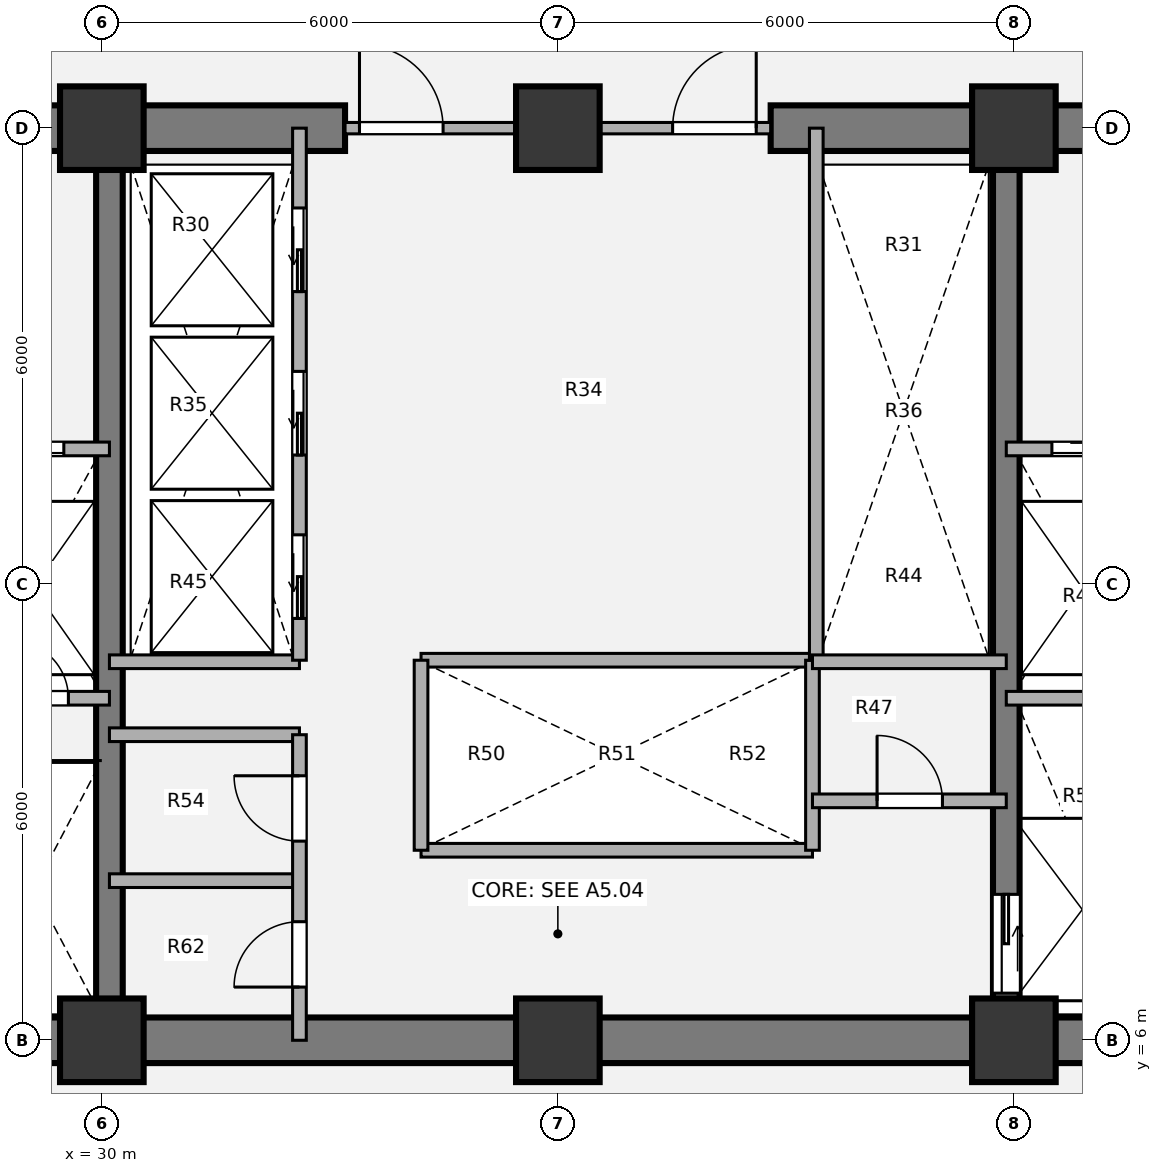
"""IFC4 building model, lengths in metres.
Left out: names, types, materials, properties, quantities, classifications, styles, units other than length and angle.
Written with IfcOpenShell. Run it as: python <this file> out.ifc"""

import sys

from ifc_helpers import new_model, si_unit, direction, frame, frame_2d, origin, origin_2d, place, context, subcontext, project, spatial, rectangle, extrude, source, transform, mapped, element, fill, save


model = new_model("IFC4")
c1 = context("Model", 3, precision=1e-05, world=origin(), true_north=direction((0.0, 1.0)))
c2 = subcontext(c1, "Body", "Model", "MODEL_VIEW")
j1 = project(units=[si_unit("LENGTHUNIT", "METRE"), si_unit("PLANEANGLEUNIT", "RADIAN")], contexts=[c1])
p1 = place(None, origin())
s1 = spatial("IfcSite", under=j1, at=p1, CompositionType="ELEMENT")
p2 = place(p1, origin())
s2 = spatial("IfcBuilding", under=s1, at=p2, CompositionType="ELEMENT")
p3 = place(p2, frame((0.0, 0.0, 64.8)))
s3 = spatial("IfcBuildingStorey", under=s2, at=p3, CompositionType="ELEMENT", Elevation=64.8)
m1 = source(origin(), c2, "Body", "SweptSolid", [
    extrude(rectangle(XDim=1.1, YDim=1.1, at=origin_2d()), origin(), (0.0, 0.0, 1.0), 3.78),
])
for number, where, z_axis, x_axis in (
    (1, (30.0, 6.0, 0.0), (0.0, 0.0, 1.0), (1.0, 0.0, 0.0)),
    (2, (36.0, 6.0, 0.0), (0.0, 0.0, 1.0), (1.0, 0.0, 0.0)),
    (3, (42.0, 6.0, 0.0), (0.0, 0.0, 1.0), (1.0, 0.0, 0.0)),
    (4, (30.0, 18.0, 0.0), (0.0, 0.0, 1.0), (1.0, 0.0, 0.0)),
    (5, (36.0, 18.0, 0.0), (0.0, 0.0, 1.0), (1.0, 0.0, 0.0)),
    (6, (42.0, 18.0, 0.0), (0.0, 0.0, 1.0), (1.0, 0.0, 0.0)),
):
    element("IfcColumn", number, at=place(p3, frame(where, z_axis=z_axis, x_axis=x_axis)), inside=s3, PredefinedType="COLUMN", context=c2, shape_type="MappedRepresentation", body=[
        mapped(m1, transform((0.0, 0.0, 0.0), x_axis=(1.0, 0.0, 0.0), y_axis=(0.0, 1.0, 0.0), z_axis=(0.0, 0.0, 1.0), scale=1.0)),
    ])
p4 = place(p3, frame((48.3, 6.0, 0.0), z_axis=(0.0, 0.0, 1.0), x_axis=(-1.0, 0.0, 0.0)))
e7 = element("IfcWall", 7, at=p4, inside=s3, PredefinedType="SHEAR", context=c2, shape_type="SweptSolid", body=[
    extrude(rectangle(XDim=24.6, YDim=0.6, at=frame_2d((12.3, 0.0))), origin(), (0.0, 0.0, 1.0), 3.78),
])
p5 = place(p3, frame((23.7, 18.0, 0.0), z_axis=(0.0, 0.0, 1.0), x_axis=(1.0, 0.0, 0.0)))
e8 = element("IfcWall", 8, at=p5, inside=s3, PredefinedType="SHEAR", context=c2, shape_type="SweptSolid", body=[
    extrude(rectangle(XDim=9.5, YDim=0.6, at=frame_2d((4.75, 0.0))), origin(), (0.0, 0.0, 1.0), 3.78),
])
p6 = place(p5, frame((2.95, 0.0, 0.0)))
e9 = element("IfcOpeningElement", 9, at=p6, cuts=e8, PredefinedType="OPENING", context=c2, shape_type="SweptSolid", body=[
    extrude(rectangle(XDim=1.1, YDim=2.1, at=origin_2d()), frame((0.55, 0.31, 1.05), z_axis=(0.0, -1.0, 0.0), x_axis=(1.0, 0.0, 0.0)), (0.0, 0.0, 1.0), 0.62),
])
p7 = place(p3, frame((38.8, 18.0, 0.0), z_axis=(0.0, 0.0, 1.0), x_axis=(1.0, 0.0, 0.0)))
e10 = element("IfcWall", 10, at=p7, inside=s3, PredefinedType="SHEAR", context=c2, shape_type="SweptSolid", body=[
    extrude(rectangle(XDim=9.5, YDim=0.6, at=frame_2d((4.75, 0.0))), origin(), (0.0, 0.0, 1.0), 3.78),
])
p8 = place(p7, frame((5.45, 0.0, 0.0)))
e11 = element("IfcOpeningElement", 11, at=p8, cuts=e10, PredefinedType="OPENING", context=c2, shape_type="SweptSolid", body=[
    extrude(rectangle(XDim=1.1, YDim=2.1, at=origin_2d()), frame((0.55, 0.31, 1.05), z_axis=(0.0, -1.0, 0.0), x_axis=(1.0, 0.0, 0.0)), (0.0, 0.0, 1.0), 0.62),
])
p9 = place(p3, frame((30.1, 6.0, 0.0), z_axis=(0.0, 0.0, 1.0), x_axis=(0.0, 1.0, 0.0)))
e12 = element("IfcWall", 12, at=p9, inside=s3, PredefinedType="SHEAR", context=c2, shape_type="SweptSolid", body=[
    extrude(rectangle(XDim=12.0, YDim=0.35, at=frame_2d((6.0, 0.0))), origin(), (0.0, 0.0, 1.0), 3.78),
])
p10 = place(p3, frame((41.9, 18.0, 0.0), z_axis=(0.0, 0.0, 1.0), x_axis=(0.0, -1.0, 0.0)))
e13 = element("IfcWall", 13, at=p10, inside=s3, PredefinedType="SHEAR", context=c2, shape_type="SweptSolid", body=[
    extrude(rectangle(XDim=12.0, YDim=0.35, at=frame_2d((6.0, 0.0))), origin(), (0.0, 0.0, 1.0), 3.78),
])
p11 = place(p10, frame((10.08, 0.0, 0.0)))
e14 = element("IfcOpeningElement", 14, at=p11, cuts=e13, PredefinedType="OPENING", context=c2, shape_type="SweptSolid", body=[
    extrude(rectangle(XDim=1.3, YDim=2.1, at=origin_2d()), frame((0.65, 0.185, 1.05), z_axis=(0.0, -1.0, 0.0), x_axis=(1.0, 0.0, 0.0)), (0.0, 0.0, 1.0), 0.37),
])
for number, where, z_axis, x_axis in (
    (15, (34.2, 11.0, 0.0), (0.0, 0.0, 1.0), (1.0, 0.0, 0.0)),
    (16, (34.2, 8.5, 0.0), (0.0, 0.0, 1.0), (1.0, 0.0, 0.0)),
):
    element("IfcWall", number, at=place(p3, frame(where, z_axis=z_axis, x_axis=x_axis)), inside=s3, PredefinedType="PARTITIONING", context=c2, shape_type="SweptSolid", body=[
        extrude(rectangle(XDim=5.15, YDim=0.18, at=frame_2d((2.575, 0.0))), origin(), (0.0, 0.0, 1.0), 3.5),
    ])
for number, where, z_axis, x_axis in (
    (17, (34.2, 8.5, 0.0), (0.0, 0.0, 1.0), (0.0, 1.0, 0.0)),
    (18, (39.35, 8.5, 0.0), (0.0, 0.0, 1.0), (0.0, 1.0, 0.0)),
):
    element("IfcWall", number, at=place(p3, frame(where, z_axis=z_axis, x_axis=x_axis)), inside=s3, PredefinedType="PARTITIONING", context=c2, shape_type="SweptSolid", body=[
        extrude(rectangle(XDim=2.5, YDim=0.18, at=frame_2d((1.25, 0.0))), origin(), (0.0, 0.0, 1.0), 3.5),
    ])
p12 = place(p3, frame((39.4, 11.0, 0.0), z_axis=(0.0, 0.0, 1.0), x_axis=(0.0, 1.0, 0.0)))
e19 = element("IfcWall", 19, at=p12, inside=s3, PredefinedType="PARTITIONING", context=c2, shape_type="SweptSolid", body=[
    extrude(rectangle(XDim=7.0, YDim=0.18, at=frame_2d((3.5, 0.0))), origin(), (0.0, 0.0, 1.0), 3.5),
])
p13 = place(p3, frame((30.1, 10.98, 0.0), z_axis=(0.0, 0.0, 1.0), x_axis=(1.0, 0.0, 0.0)))
e20 = element("IfcWall", 20, at=p13, inside=s3, PredefinedType="PARTITIONING", context=c2, shape_type="SweptSolid", body=[
    extrude(rectangle(XDim=2.5, YDim=0.18, at=frame_2d((1.25, 0.0))), origin(), (0.0, 0.0, 1.0), 3.5),
])
p14 = place(p3, frame((39.35, 10.98, 0.0), z_axis=(0.0, 0.0, 1.0), x_axis=(1.0, 0.0, 0.0)))
e21 = element("IfcWall", 21, at=p14, inside=s3, PredefinedType="PARTITIONING", context=c2, shape_type="SweptSolid", body=[
    extrude(rectangle(XDim=2.55, YDim=0.18, at=frame_2d((1.275, 0.0))), origin(), (0.0, 0.0, 1.0), 3.5),
])
for number, where, z_axis, x_axis in (
    (22, (30.1, 8.1, 0.0), (0.0, 0.0, 1.0), (1.0, 0.0, 0.0)),
    (23, (30.1, 10.02, 0.0), (0.0, 0.0, 1.0), (1.0, 0.0, 0.0)),
):
    element("IfcWall", number, at=place(p3, frame(where, z_axis=z_axis, x_axis=x_axis)), inside=s3, PredefinedType="PARTITIONING", context=c2, shape_type="SweptSolid", body=[
        extrude(rectangle(XDim=2.5, YDim=0.18, at=frame_2d((1.25, 0.0))), origin(), (0.0, 0.0, 1.0), 3.5),
    ])
p15 = place(p3, frame((32.6, 6.0, 0.0), z_axis=(0.0, 0.0, 1.0), x_axis=(0.0, 1.0, 0.0)))
e24 = element("IfcWall", 24, at=p15, inside=s3, PredefinedType="PARTITIONING", context=c2, shape_type="SweptSolid", body=[
    extrude(rectangle(XDim=4.02, YDim=0.18, at=frame_2d((2.01, 0.0))), origin(), (0.0, 0.0, 1.0), 3.5),
])
p16 = place(p15, frame((0.7, 0.0, 0.0)))
e25 = element("IfcOpeningElement", 25, at=p16, cuts=e24, PredefinedType="OPENING", context=c2, shape_type="SweptSolid", body=[
    extrude(rectangle(XDim=0.86, YDim=2.1, at=origin_2d()), frame((0.43, 0.1, 1.05), z_axis=(0.0, -1.0, 0.0), x_axis=(1.0, 0.0, 0.0)), (0.0, 0.0, 1.0), 0.2),
])
p17 = place(p15, frame((2.62, 0.0, 0.0)))
e26 = element("IfcOpeningElement", 26, at=p17, cuts=e24, PredefinedType="OPENING", context=c2, shape_type="SweptSolid", body=[
    extrude(rectangle(XDim=0.86, YDim=2.1, at=origin_2d()), frame((0.43, 0.1, 1.05), z_axis=(0.0, -1.0, 0.0), x_axis=(1.0, 0.0, 0.0)), (0.0, 0.0, 1.0), 0.2),
])
p18 = place(p3, frame((39.35, 9.15, 0.0), z_axis=(0.0, 0.0, 1.0), x_axis=(1.0, 0.0, 0.0)))
e27 = element("IfcWall", 27, at=p18, inside=s3, PredefinedType="PARTITIONING", context=c2, shape_type="SweptSolid", body=[
    extrude(rectangle(XDim=2.55, YDim=0.18, at=frame_2d((1.275, 0.0))), origin(), (0.0, 0.0, 1.0), 3.5),
])
p19 = place(p18, frame((0.85, 0.0, 0.0)))
e28 = element("IfcOpeningElement", 28, at=p19, cuts=e27, PredefinedType="OPENING", context=c2, shape_type="SweptSolid", body=[
    extrude(rectangle(XDim=0.86, YDim=2.1, at=origin_2d()), frame((0.43, 0.1, 1.05), z_axis=(0.0, -1.0, 0.0), x_axis=(1.0, 0.0, 0.0)), (0.0, 0.0, 1.0), 0.2),
])
p20 = place(p3, frame((33.2, 18.0, 0.0), z_axis=(0.0, 0.0, 1.0), x_axis=(1.0, 0.0, 0.0)))
e29 = element("IfcWall", 29, at=p20, inside=s3, PredefinedType="PARTITIONING", context=c2, shape_type="SweptSolid", body=[
    extrude(rectangle(XDim=5.6, YDim=0.15, at=frame_2d((2.8, 0.0))), origin(), (0.0, 0.0, 1.0), 2.315),
])
p21 = place(p20, frame((0.19, 0.0, 0.0)))
e30 = element("IfcOpeningElement", 30, at=p21, cuts=e29, PredefinedType="OPENING", context=c2, shape_type="SweptSolid", body=[
    extrude(rectangle(XDim=1.1, YDim=2.1, at=origin_2d()), frame((0.55, 0.085, 1.05), z_axis=(0.0, -1.0, 0.0), x_axis=(1.0, 0.0, 0.0)), (0.0, 0.0, 1.0), 0.17),
])
p22 = place(p20, frame((4.31, 0.0, 0.0)))
e31 = element("IfcOpeningElement", 31, at=p22, cuts=e29, PredefinedType="OPENING", context=c2, shape_type="SweptSolid", body=[
    extrude(rectangle(XDim=1.1, YDim=2.1, at=origin_2d()), frame((0.55, 0.085, 1.05), z_axis=(0.0, -1.0, 0.0), x_axis=(1.0, 0.0, 0.0)), (0.0, 0.0, 1.0), 0.17),
])
p23 = place(p3, frame((24.0, 13.78, 0.0), z_axis=(0.0, 0.0, 1.0), x_axis=(1.0, 0.0, 0.0)))
e32 = element("IfcWall", 32, at=p23, inside=s3, PredefinedType="PARTITIONING", context=c2, shape_type="SweptSolid", body=[
    extrude(rectangle(XDim=6.1, YDim=0.18, at=frame_2d((3.05, 0.0))), origin(), (0.0, 0.0, 1.0), 3.5),
])
p24 = place(p23, frame((1.15, 0.0, 0.0)))
e33 = element("IfcOpeningElement", 33, at=p24, cuts=e32, PredefinedType="OPENING", context=c2, shape_type="SweptSolid", body=[
    extrude(rectangle(XDim=1.1, YDim=2.1, at=origin_2d()), frame((0.55, 0.1, 1.05), z_axis=(0.0, -1.0, 0.0), x_axis=(1.0, 0.0, 0.0)), (0.0, 0.0, 1.0), 0.2),
])
p25 = place(p23, frame((4.4, 0.0, 0.0)))
e34 = element("IfcOpeningElement", 34, at=p25, cuts=e32, PredefinedType="OPENING", context=c2, shape_type="SweptSolid", body=[
    extrude(rectangle(XDim=1.1, YDim=2.1, at=origin_2d()), frame((0.55, 0.1, 1.05), z_axis=(0.0, -1.0, 0.0), x_axis=(1.0, 0.0, 0.0)), (0.0, 0.0, 1.0), 0.2),
])
p26 = place(p3, frame((28.15, 10.5, 0.0), z_axis=(0.0, 0.0, 1.0), x_axis=(1.0, 0.0, 0.0)))
e35 = element("IfcWall", 35, at=p26, inside=s3, PredefinedType="PARTITIONING", context=c2, shape_type="SweptSolid", body=[
    extrude(rectangle(XDim=1.95, YDim=0.18, at=frame_2d((0.975, 0.0))), origin(), (0.0, 0.0, 1.0), 3.5),
])
p27 = place(p26, frame((0.65, 0.0, 0.0)))
e36 = element("IfcOpeningElement", 36, at=p27, cuts=e35, PredefinedType="OPENING", context=c2, shape_type="SweptSolid", body=[
    extrude(rectangle(XDim=0.76, YDim=2.05, at=origin_2d()), frame((0.38, 0.1, 1.025), z_axis=(0.0, -1.0, 0.0), x_axis=(1.0, 0.0, 0.0)), (0.0, 0.0, 1.0), 0.2),
])
p28 = place(p3, frame((41.9, 13.78, 0.0), z_axis=(0.0, 0.0, 1.0), x_axis=(1.0, 0.0, 0.0)))
e37 = element("IfcWall", 37, at=p28, inside=s3, PredefinedType="PARTITIONING", context=c2, shape_type="SweptSolid", body=[
    extrude(rectangle(XDim=6.1, YDim=0.18, at=frame_2d((3.05, 0.0))), origin(), (0.0, 0.0, 1.0), 3.5),
])
p29 = place(p28, frame((0.6, 0.0, 0.0)))
e38 = element("IfcOpeningElement", 38, at=p29, cuts=e37, PredefinedType="OPENING", context=c2, shape_type="SweptSolid", body=[
    extrude(rectangle(XDim=1.1, YDim=2.1, at=origin_2d()), frame((0.55, 0.1, 1.05), z_axis=(0.0, -1.0, 0.0), x_axis=(1.0, 0.0, 0.0)), (0.0, 0.0, 1.0), 0.2),
])
p30 = place(p28, frame((3.8, 0.0, 0.0)))
e39 = element("IfcOpeningElement", 39, at=p30, cuts=e37, PredefinedType="OPENING", context=c2, shape_type="SweptSolid", body=[
    extrude(rectangle(XDim=1.1, YDim=2.1, at=origin_2d()), frame((0.55, 0.1, 1.05), z_axis=(0.0, -1.0, 0.0), x_axis=(1.0, 0.0, 0.0)), (0.0, 0.0, 1.0), 0.2),
])
p31 = place(p3, frame((41.9, 10.5, 0.0), z_axis=(0.0, 0.0, 1.0), x_axis=(1.0, 0.0, 0.0)))
e40 = element("IfcWall", 40, at=p31, inside=s3, PredefinedType="PARTITIONING", context=c2, shape_type="SweptSolid", body=[
    extrude(rectangle(XDim=1.95, YDim=0.18, at=frame_2d((0.975, 0.0))), origin(), (0.0, 0.0, 1.0), 3.5),
])
p32 = place(p3, frame((32.6, 11.0, 0.0), z_axis=(0.0, 0.0, 1.0), x_axis=(0.0, 1.0, 0.0)))
e41 = element("IfcWall", 41, at=p32, inside=s3, PredefinedType="PARTITIONING", context=c2, shape_type="SweptSolid", body=[
    extrude(rectangle(XDim=7.0, YDim=0.18, at=frame_2d((3.5, 0.0))), origin(), (0.0, 0.0, 1.0), 3.5),
])
p33 = place(p32, frame((0.55, 0.0, 0.0)))
e42 = element("IfcOpeningElement", 42, at=p33, cuts=e41, PredefinedType="OPENING", context=c2, shape_type="SweptSolid", body=[
    extrude(rectangle(XDim=1.1, YDim=2.1, at=origin_2d()), frame((0.55, 0.1, 1.05), z_axis=(0.0, -1.0, 0.0), x_axis=(1.0, 0.0, 0.0)), (0.0, 0.0, 1.0), 0.2),
])
p34 = place(p32, frame((2.7, 0.0, 0.0)))
e43 = element("IfcOpeningElement", 43, at=p34, cuts=e41, PredefinedType="OPENING", context=c2, shape_type="SweptSolid", body=[
    extrude(rectangle(XDim=1.1, YDim=2.1, at=origin_2d()), frame((0.55, 0.1, 1.05), z_axis=(0.0, -1.0, 0.0), x_axis=(1.0, 0.0, 0.0)), (0.0, 0.0, 1.0), 0.2),
])
p35 = place(p32, frame((4.85, 0.0, 0.0)))
e44 = element("IfcOpeningElement", 44, at=p35, cuts=e41, PredefinedType="OPENING", context=c2, shape_type="SweptSolid", body=[
    extrude(rectangle(XDim=1.1, YDim=2.1, at=origin_2d()), frame((0.55, 0.1, 1.05), z_axis=(0.0, -1.0, 0.0), x_axis=(1.0, 0.0, 0.0)), (0.0, 0.0, 1.0), 0.2),
])
m2 = source(origin(), c2, "Body", "SweptSolid", [
    extrude(rectangle(XDim=0.86, YDim=2.1, at=origin_2d()), frame((0.43, 0.025, 1.05), z_axis=(0.0, -1.0, 0.0), x_axis=(1.0, 0.0, 0.0)), (0.0, 0.0, 1.0), 0.05),
])
p36 = place(p16, origin())
e45 = element("IfcDoor", 45, at=p36, inside=s3, OperationType="SINGLE_SWING_LEFT", PredefinedType="DOOR", context=c2, shape_type="MappedRepresentation", body=[
    mapped(m2, transform((0.0, 0.0, 0.0), x_axis=(1.0, 0.0, 0.0), y_axis=(0.0, 1.0, 0.0), z_axis=(0.0, 0.0, 1.0), scale=1.0)),
])
fill(e25, e45)
p37 = place(p17, origin())
e46 = element("IfcDoor", 46, at=p37, inside=s3, OperationType="SINGLE_SWING_RIGHT", PredefinedType="DOOR", context=c2, shape_type="MappedRepresentation", body=[
    mapped(m2, transform((0.0, 0.0, 0.0), x_axis=(1.0, 0.0, 0.0), y_axis=(0.0, 1.0, 0.0), z_axis=(0.0, 0.0, 1.0), scale=1.0)),
])
fill(e26, e46)
p38 = place(p19, origin())
e47 = element("IfcDoor", 47, at=p38, inside=s3, OperationType="SINGLE_SWING_LEFT", PredefinedType="DOOR", context=c2, shape_type="MappedRepresentation", body=[
    mapped(m2, transform((0.0, 0.0, 0.0), x_axis=(1.0, 0.0, 0.0), y_axis=(0.0, 1.0, 0.0), z_axis=(0.0, 0.0, 1.0), scale=1.0)),
])
fill(e28, e47)
m3 = source(origin(), c2, "Body", "SweptSolid", [
    extrude(rectangle(XDim=1.1, YDim=2.1, at=origin_2d()), frame((0.55, 0.025, 1.05), z_axis=(0.0, -1.0, 0.0), x_axis=(1.0, 0.0, 0.0)), (0.0, 0.0, 1.0), 0.05),
])
p39 = place(p21, origin())
e48 = element("IfcDoor", 48, at=p39, inside=s3, OperationType="SINGLE_SWING_LEFT", PredefinedType="DOOR", context=c2, shape_type="MappedRepresentation", body=[
    mapped(m3, transform((0.0, 0.0, 0.0), x_axis=(1.0, 0.0, 0.0), y_axis=(0.0, 1.0, 0.0), z_axis=(0.0, 0.0, 1.0), scale=1.0)),
])
fill(e30, e48)
p40 = place(p22, origin())
e49 = element("IfcDoor", 49, at=p40, inside=s3, OperationType="SINGLE_SWING_RIGHT", PredefinedType="DOOR", context=c2, shape_type="MappedRepresentation", body=[
    mapped(m3, transform((0.0, 0.0, 0.0), x_axis=(1.0, 0.0, 0.0), y_axis=(0.0, 1.0, 0.0), z_axis=(0.0, 0.0, 1.0), scale=1.0)),
])
fill(e31, e49)
m4 = source(origin(), c2, "Body", "SweptSolid", [
    extrude(rectangle(XDim=1.1, YDim=2.1, at=origin_2d()), frame((0.55, 0.025, 1.05), z_axis=(0.0, -1.0, 0.0), x_axis=(1.0, 0.0, 0.0)), (0.0, 0.0, 1.0), 0.05),
])
p41 = place(p25, origin())
e50 = element("IfcDoor", 50, at=p41, inside=s3, OperationType="SLIDING_TO_LEFT", PredefinedType="DOOR", context=c2, shape_type="MappedRepresentation", body=[
    mapped(m4, transform((0.0, 0.0, 0.0), x_axis=(1.0, 0.0, 0.0), y_axis=(0.0, 1.0, 0.0), z_axis=(0.0, 0.0, 1.0), scale=1.0)),
])
fill(e34, e50)
m5 = source(origin(), c2, "Body", "SweptSolid", [
    extrude(rectangle(XDim=0.76, YDim=2.05, at=origin_2d()), frame((0.38, 0.025, 1.025), z_axis=(0.0, -1.0, 0.0), x_axis=(1.0, 0.0, 0.0)), (0.0, 0.0, 1.0), 0.05),
])
p42 = place(p27, origin())
e51 = element("IfcDoor", 51, at=p42, inside=s3, OperationType="SINGLE_SWING_LEFT", PredefinedType="DOOR", context=c2, shape_type="MappedRepresentation", body=[
    mapped(m5, transform((0.0, 0.0, 0.0), x_axis=(1.0, 0.0, 0.0), y_axis=(0.0, 1.0, 0.0), z_axis=(0.0, 0.0, 1.0), scale=1.0)),
])
fill(e36, e51)
p43 = place(p29, origin())
e52 = element("IfcDoor", 52, at=p43, inside=s3, OperationType="SLIDING_TO_RIGHT", PredefinedType="DOOR", context=c2, shape_type="MappedRepresentation", body=[
    mapped(m4, transform((0.0, 0.0, 0.0), x_axis=(1.0, 0.0, 0.0), y_axis=(0.0, 1.0, 0.0), z_axis=(0.0, 0.0, 1.0), scale=1.0)),
])
fill(e38, e52)
m6 = source(origin(), c2, "Body", "SweptSolid", [
    extrude(rectangle(XDim=1.3, YDim=2.1, at=origin_2d()), frame((0.65, 0.025, 1.05), z_axis=(0.0, -1.0, 0.0), x_axis=(1.0, 0.0, 0.0)), (0.0, 0.0, 1.0), 0.05),
])
p44 = place(p11, origin())
e53 = element("IfcDoor", 53, at=p44, inside=s3, OperationType="SLIDING_TO_LEFT", PredefinedType="DOOR", context=c2, shape_type="MappedRepresentation", body=[
    mapped(m6, transform((0.0, 0.0, 0.0), x_axis=(1.0, 0.0, 0.0), y_axis=(0.0, 1.0, 0.0), z_axis=(0.0, 0.0, 1.0), scale=1.0)),
])
fill(e14, e53)
p45 = place(p33, origin())
e54 = element("IfcDoor", 54, at=p45, inside=s3, OperationType="SLIDING_TO_LEFT", PredefinedType="DOOR", context=c2, shape_type="MappedRepresentation", body=[
    mapped(m4, transform((0.0, 0.0, 0.0), x_axis=(1.0, 0.0, 0.0), y_axis=(0.0, 1.0, 0.0), z_axis=(0.0, 0.0, 1.0), scale=1.0)),
])
fill(e42, e54)
p46 = place(p34, origin())
e55 = element("IfcDoor", 55, at=p46, inside=s3, OperationType="SLIDING_TO_LEFT", PredefinedType="DOOR", context=c2, shape_type="MappedRepresentation", body=[
    mapped(m4, transform((0.0, 0.0, 0.0), x_axis=(1.0, 0.0, 0.0), y_axis=(0.0, 1.0, 0.0), z_axis=(0.0, 0.0, 1.0), scale=1.0)),
])
fill(e43, e55)
p47 = place(p35, origin())
e56 = element("IfcDoor", 56, at=p47, inside=s3, OperationType="SLIDING_TO_LEFT", PredefinedType="DOOR", context=c2, shape_type="MappedRepresentation", body=[
    mapped(m4, transform((0.0, 0.0, 0.0), x_axis=(1.0, 0.0, 0.0), y_axis=(0.0, 1.0, 0.0), z_axis=(0.0, 0.0, 1.0), scale=1.0)),
])
fill(e44, e56)
save(model, sys.argv[1])
